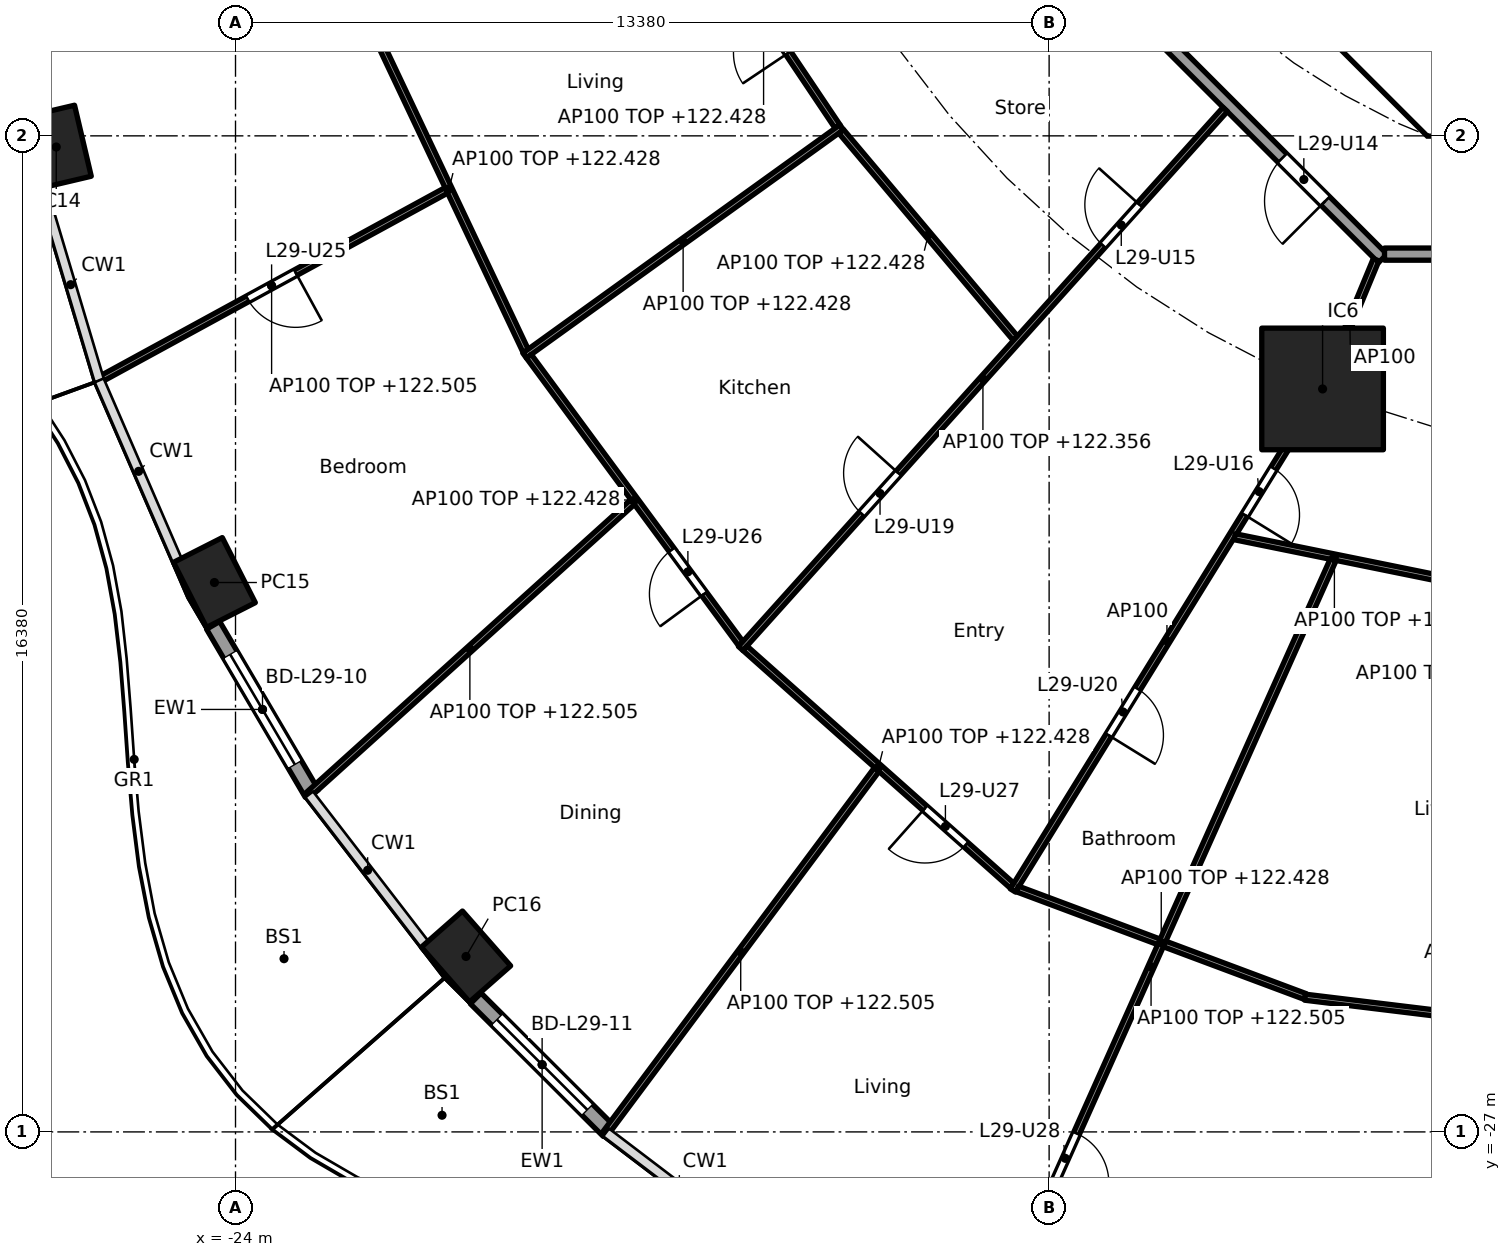
"""IFC4 building model, lengths in metres.
Left out: names, types, materials, properties, quantities, classifications, styles, units other than length and angle.
Written with IfcOpenShell. Run it as: python <this file> out.ifc"""

import sys

from ifc_helpers import new_model, si_unit, direction, frame, frame_2d, origin, origin_2d, place, context, subcontext, project, spatial, polyline, rectangle, hollow_rectangle, outline, extrude, element, fill, save


model = new_model("IFC4")
c1 = context("Model", 3, precision=1e-05, world=origin(), true_north=direction((0.0, 1.0)))
c2 = subcontext(c1, "Body", "Model", "MODEL_VIEW")
j1 = project(units=[si_unit("LENGTHUNIT", "METRE"), si_unit("PLANEANGLEUNIT", "RADIAN")], contexts=[c1])
p1 = place(None, origin())
s1 = spatial("IfcSite", under=j1, at=p1, CompositionType="ELEMENT")
p2 = place(p1, origin())
s2 = spatial("IfcBuilding", under=s1, at=p2, CompositionType="ELEMENT")
p3 = place(p2, frame((0.0, 0.0, 119.6)))
s3 = spatial("IfcBuildingStorey", under=s2, at=p3, CompositionType="ELEMENT", Elevation=119.6)
for number, where, z_axis, x_axis in (
    (1, (-26.948, -10.803, -0.26), (0.0, 0.0, 1.0), (0.229, -0.973, 0.0)),
    (2, (-24.347, -17.965, -0.26), (0.0, 0.0, 1.0), (0.452, -0.892, 0.0)),
    (3, (-20.209, -24.115, -0.26), (0.0, 0.0, 1.0), (0.66, -0.751, 0.0)),
):
    element("IfcColumn", number, at=place(p3, frame(where, z_axis=z_axis, x_axis=x_axis)), inside=s3, PredefinedType="COLUMN", context=c2, shape_type="SweptSolid", body=[
        extrude(hollow_rectangle(XDim=1.2, YDim=0.9, WallThickness=0.04, at=origin_2d()), origin(), (0.0, 0.0, 1.0), 3.96),
    ])
p4 = place(p3, frame((-6.123, -14.782, 0.0), z_axis=(0.0, 0.0, 1.0), x_axis=(1.0, 0.0, 0.0)))
e4 = element("IfcColumn", 4, at=p4, inside=s3, PredefinedType="COLUMN", context=c2, shape_type="SweptSolid", body=[
    extrude(rectangle(XDim=2.0, YDim=2.0, at=origin_2d()), origin(), (0.0, 0.0, 1.0), 3.7),
])
p5 = place(p3, frame((-22.744, -21.436, 0.0), z_axis=(0.0, 0.0, 1.0), x_axis=(-0.506314982873, 0.862348617508, 0.0)))
e5 = element("IfcWall", 5, at=p5, inside=s3, PredefinedType="SOLIDWALL", context=c2, shape_type="SweptSolid", body=[
    extrude(rectangle(XDim=3.208, YDim=0.25, at=frame_2d((1.604, 0.0))), origin(), (0.0, 0.0, 1.0), 3.44),
])
p6 = place(p5, frame((0.554, 0.0, 0.0)))
e6 = element("IfcOpeningElement", 6, at=p6, cuts=e5, PredefinedType="OPENING", context=c2, shape_type="SweptSolid", body=[
    extrude(rectangle(XDim=2.1, YDim=2.4, at=frame_2d((1.05, 1.2))), frame((0.0, 0.135, 0.0), z_axis=(0.0, -1.0, 0.0), x_axis=(1.0, 0.0, 0.0)), (0.0, 0.0, 1.0), 0.27),
])
p7 = place(p3, frame((-17.865, -26.985, 0.0), z_axis=(0.0, 0.0, 1.0), x_axis=(-0.707818274975, 0.706394570768, 0.0)))
e7 = element("IfcWall", 7, at=p7, inside=s3, PredefinedType="SOLIDWALL", context=c2, shape_type="SweptSolid", body=[
    extrude(rectangle(XDim=3.087, YDim=0.25, at=frame_2d((1.543, 0.0))), origin(), (0.0, 0.0, 1.0), 3.44),
])
p8 = place(p7, frame((0.493, 0.0, 0.0)))
e8 = element("IfcOpeningElement", 8, at=p8, cuts=e7, PredefinedType="OPENING", context=c2, shape_type="SweptSolid", body=[
    extrude(rectangle(XDim=2.1, YDim=2.4, at=frame_2d((1.05, 1.2))), frame((0.0, 0.135, 0.0), z_axis=(0.0, -1.0, 0.0), x_axis=(1.0, 0.0, 0.0)), (0.0, 0.0, 1.0), 0.27),
])
p9 = place(p3, frame((-9.988, -4.613, 0.0), z_axis=(0.0, 0.0, 1.0), x_axis=(0.707106781187, -0.707106781187, 0.0)))
e9 = element("IfcWall", 9, at=p9, inside=s3, PredefinedType="SHEAR", context=c2, shape_type="SweptSolid", body=[
    extrude(rectangle(XDim=7.602, YDim=0.6, at=frame_2d((3.801, 0.0))), origin(), (0.0, 0.0, 1.0), 3.44),
])
p10 = place(p9, frame((6.151, 0.0, 0.0)))
e10 = element("IfcOpeningElement", 10, at=p10, cuts=e9, PredefinedType="OPENING", context=c2, shape_type="SweptSolid", body=[
    extrude(rectangle(XDim=1.1, YDim=2.1, at=frame_2d((0.55, 1.05))), frame((0.0, 0.31, 0.0), z_axis=(0.0, -1.0, 0.0), x_axis=(1.0, 0.0, 0.0)), (0.0, 0.0, 1.0), 0.62),
])
p11 = place(p3, origin())
e11 = element("IfcWall", 11, at=p11, inside=s3, PredefinedType="SHEAR", context=c2, shape_type="SweptSolid", body=[
    extrude(outline(polyline([(-4.152, -10.025), (4.152, -10.025), (4.401, -9.776), (4.825, -10.2), (4.401, -10.625), (-4.401, -10.625), (-4.825, -10.2), (-4.401, -9.776), (-4.152, -10.025)])), origin(), (0.0, 0.0, 1.0), 3.44),
])
p12 = place(p3, frame((-12.635, -5.134, 0.0), z_axis=(0.0, 0.0, 1.0), x_axis=(0.707106781187, -0.707106781187, 0.0)))
e12 = element("IfcWall", 12, at=p12, inside=s3, PredefinedType="PARTITIONING", context=c2, shape_type="SweptSolid", body=[
    extrude(rectangle(XDim=10.609, YDim=0.2, at=frame_2d((5.305, 0.0))), origin(), (0.0, 0.0, 1.0), 3.44),
])
p13 = place(p12, frame((8.274, 0.0, 0.0)))
e13 = element("IfcOpeningElement", 13, at=p13, cuts=e12, PredefinedType="OPENING", context=c2, shape_type="SweptSolid", body=[
    extrude(rectangle(XDim=1.0, YDim=2.1, at=frame_2d((0.5, 1.05))), frame((0.0, 0.11, 0.0), z_axis=(0.0, -1.0, 0.0), x_axis=(1.0, 0.0, 0.0)), (0.0, 0.0, 1.0), 0.22),
])
p14 = place(p3, frame((-5.104, -12.565, 0.0), z_axis=(0.0, 0.0, 1.0), x_axis=(1.0, 0.0, 0.0)))
e14 = element("IfcWall", 14, at=p14, inside=s3, PredefinedType="PARTITIONING", context=c2, shape_type="SweptSolid", body=[
    extrude(rectangle(XDim=10.409, YDim=0.2, at=frame_2d((5.205, 0.0))), origin(), (0.0, 0.0, 1.0), 3.44),
])
p15 = place(p3, frame((-16.532, -6.84, 0.0), z_axis=(0.0, 0.0, 1.0), x_axis=(0.556994773624, -0.830515997531, 0.0)))
e15 = element("IfcWall", 15, at=p15, inside=s3, PredefinedType="PARTITIONING", context=c2, shape_type="SweptSolid", body=[
    extrude(rectangle(XDim=4.366, YDim=0.1, at=frame_2d((2.183, 0.0))), origin(), (0.0, 0.0, 1.0), 2.828),
])
p16 = place(p15, frame((2.01, 0.0, 0.0)))
e16 = element("IfcOpeningElement", 16, at=p16, cuts=e15, PredefinedType="OPENING", context=c2, shape_type="SweptSolid", body=[
    extrude(rectangle(XDim=0.9, YDim=2.1, at=frame_2d((0.45, 1.05))), frame((0.0, 0.06, 0.0), z_axis=(0.0, -1.0, 0.0), x_axis=(1.0, 0.0, 0.0)), (0.0, 0.0, 1.0), 0.12),
])
p17 = place(p3, frame((-21.75, -8.826, 0.0), z_axis=(0.0, 0.0, 1.0), x_axis=(0.427739388908, -0.903902104863, 0.0)))
e17 = element("IfcWall", 17, at=p17, inside=s3, PredefinedType="PARTITIONING", context=c2, shape_type="SweptSolid", body=[
    extrude(rectangle(XDim=5.899, YDim=0.1, at=frame_2d((2.949, 0.0))), origin(), (0.0, 0.0, 1.0), 2.828),
])
p18 = place(p3, frame((-20.533, -11.516, 0.0), z_axis=(0.0, 0.0, 1.0), x_axis=(-0.877731656478, -0.479152521872, 0.0)))
e18 = element("IfcWall", 18, at=p18, inside=s3, PredefinedType="PARTITIONING", context=c2, shape_type="SweptSolid", body=[
    extrude(rectangle(XDim=6.548, YDim=0.1, at=frame_2d((3.274, 0.0))), origin(), (0.0, 0.0, 1.0), 2.905),
])
p19 = place(p18, frame((2.824, 0.0, 0.0)))
e19 = element("IfcOpeningElement", 19, at=p19, cuts=e18, PredefinedType="OPENING", context=c2, shape_type="SweptSolid", body=[
    extrude(rectangle(XDim=0.9, YDim=2.1, at=frame_2d((0.45, 1.05))), frame((0.0, 0.06, 0.0), z_axis=(0.0, -1.0, 0.0), x_axis=(1.0, 0.0, 0.0)), (0.0, 0.0, 1.0), 0.12),
])
p20 = place(p3, frame((-14.031, -10.479, 0.0), z_axis=(0.0, 0.0, 1.0), x_axis=(-0.811653955345, -0.584138559567, 0.0)))
e20 = element("IfcWall", 20, at=p20, inside=s3, PredefinedType="PARTITIONING", context=c2, shape_type="SweptSolid", body=[
    extrude(rectangle(XDim=6.426, YDim=0.1, at=frame_2d((3.213, 0.0))), origin(), (0.0, 0.0, 1.0), 2.828),
])
p21 = place(p3, frame((-14.04, -10.547, 0.0), z_axis=(0.0, 0.0, 1.0), x_axis=(0.644036028289, -0.764995159635, 0.0)))
e21 = element("IfcWall", 21, at=p21, inside=s3, PredefinedType="PARTITIONING", context=c2, shape_type="SweptSolid", body=[
    extrude(rectangle(XDim=4.448, YDim=0.1, at=frame_2d((2.224, 0.0))), origin(), (0.0, 0.0, 1.0), 2.828),
])
p22 = place(p3, frame((-19.176, -14.244, 0.0), z_axis=(0.0, 0.0, 1.0), x_axis=(0.593532053206, -0.80481035146, 0.0)))
e22 = element("IfcWall", 22, at=p22, inside=s3, PredefinedType="PARTITIONING", context=c2, shape_type="SweptSolid", body=[
    extrude(rectangle(XDim=5.876, YDim=0.1, at=frame_2d((2.938, 0.0))), origin(), (0.0, 0.0, 1.0), 2.828),
])
p23 = place(p22, frame((3.957, 0.0, 0.0)))
e23 = element("IfcOpeningElement", 23, at=p23, cuts=e22, PredefinedType="OPENING", context=c2, shape_type="SweptSolid", body=[
    extrude(rectangle(XDim=0.9, YDim=2.1, at=frame_2d((0.45, 1.05))), frame((0.0, 0.06, 0.0), z_axis=(0.0, -1.0, 0.0), x_axis=(1.0, 0.0, 0.0)), (0.0, 0.0, 1.0), 0.12),
])
p24 = place(p3, frame((-17.47, -16.642, 0.0), z_axis=(0.0, 0.0, 1.0), x_axis=(-0.742345465337, -0.670017320742, 0.0)))
e24 = element("IfcWall", 24, at=p24, inside=s3, PredefinedType="PARTITIONING", context=c2, shape_type="SweptSolid", body=[
    extrude(rectangle(XDim=7.21, YDim=0.1, at=frame_2d((3.605, 0.0))), origin(), (0.0, 0.0, 1.0), 2.905),
])
p25 = place(p3, frame((-7.725, -10.186, 0.0), z_axis=(0.0, 0.0, 1.0), x_axis=(-0.668498346565, -0.743713628112, 0.0)))
e25 = element("IfcWall", 25, at=p25, inside=s3, PredefinedType="PARTITIONING", context=c2, shape_type="SweptSolid", body=[
    extrude(rectangle(XDim=11.919, YDim=0.1, at=frame_2d((5.959, 0.0))), origin(), (0.0, 0.0, 1.0), 2.756),
])
p26 = place(p25, frame((2.106, 0.0, 0.0)))
e26 = element("IfcOpeningElement", 26, at=p26, cuts=e25, PredefinedType="OPENING", context=c2, shape_type="SweptSolid", body=[
    extrude(rectangle(XDim=0.9, YDim=2.1, at=frame_2d((0.45, 1.05))), frame((0.0, 0.06, 0.0), z_axis=(0.0, -1.0, 0.0), x_axis=(1.0, 0.0, 0.0)), (0.0, 0.0, 1.0), 0.12),
])
p27 = place(p25, frame((8.041, 0.0, 0.0)))
e27 = element("IfcOpeningElement", 27, at=p27, cuts=e25, PredefinedType="OPENING", context=c2, shape_type="SweptSolid", body=[
    extrude(rectangle(XDim=0.9, YDim=2.1, at=frame_2d((0.45, 1.05))), frame((0.0, 0.06, 0.0), z_axis=(0.0, -1.0, 0.0), x_axis=(1.0, 0.0, 0.0)), (0.0, 0.0, 1.0), 0.12),
])
p28 = place(p3, frame((-15.622, -19.046, 0.0), z_axis=(0.0, 0.0, 1.0), x_axis=(0.747342891849, -0.664438561496, 0.0)))
e28 = element("IfcWall", 28, at=p28, inside=s3, PredefinedType="PARTITIONING", context=c2, shape_type="SweptSolid", body=[
    extrude(rectangle(XDim=5.881, YDim=0.1, at=frame_2d((2.94, 0.0))), origin(), (0.0, 0.0, 1.0), 2.828),
])
p29 = place(p28, frame((3.961, 0.0, 0.0)))
e29 = element("IfcOpeningElement", 29, at=p29, cuts=e28, PredefinedType="OPENING", context=c2, shape_type="SweptSolid", body=[
    extrude(rectangle(XDim=0.9, YDim=2.1, at=frame_2d((0.45, 1.05))), frame((0.0, 0.06, 0.0), z_axis=(0.0, -1.0, 0.0), x_axis=(1.0, 0.0, 0.0)), (0.0, 0.0, 1.0), 0.12),
])
p30 = place(p3, frame((-13.454, -21.04, 0.0), z_axis=(0.0, 0.0, 1.0), x_axis=(-0.597848033124, -0.801609461826, 0.0)))
e30 = element("IfcWall", 30, at=p30, inside=s3, PredefinedType="PARTITIONING", context=c2, shape_type="SweptSolid", body=[
    extrude(rectangle(XDim=7.486, YDim=0.1, at=frame_2d((3.743, 0.0))), origin(), (0.0, 0.0, 1.0), 2.905),
])
p31 = place(p3, frame((-5.243, -12.657, 0.0), z_axis=(0.0, 0.0, 1.0), x_axis=(-0.382811769845, -0.923826362943, 0.0)))
e31 = element("IfcWall", 31, at=p31, inside=s3, PredefinedType="PARTITIONING", context=c2, shape_type="SweptSolid", body=[
    extrude(rectangle(XDim=2.25, YDim=0.1, at=frame_2d((1.125, 0.0))), origin(), (0.0, 0.0, 1.0), 3.44),
])
p32 = place(p3, frame((-6.149, -14.825, 0.0), z_axis=(0.0, 0.0, 1.0), x_axis=(-0.525396393596, -0.850857584791, 0.0)))
e32 = element("IfcWall", 32, at=p32, inside=s3, PredefinedType="PARTITIONING", context=c2, shape_type="SweptSolid", body=[
    extrude(rectangle(XDim=9.643, YDim=0.1, at=frame_2d((4.822, 0.0))), origin(), (0.0, 0.0, 1.0), 3.44),
])
p33 = place(p32, frame((1.485, 0.0, 0.0)))
e33 = element("IfcOpeningElement", 33, at=p33, cuts=e32, PredefinedType="OPENING", context=c2, shape_type="SweptSolid", body=[
    extrude(rectangle(XDim=0.9, YDim=2.1, at=frame_2d((0.45, 1.05))), frame((0.0, 0.06, 0.0), z_axis=(0.0, -1.0, 0.0), x_axis=(1.0, 0.0, 0.0)), (0.0, 0.0, 1.0), 0.12),
])
p34 = place(p32, frame((5.744, 0.0, 0.0)))
e34 = element("IfcOpeningElement", 34, at=p34, cuts=e32, PredefinedType="OPENING", context=c2, shape_type="SweptSolid", body=[
    extrude(rectangle(XDim=0.9, YDim=2.1, at=frame_2d((0.45, 1.05))), frame((0.0, 0.06, 0.0), z_axis=(0.0, -1.0, 0.0), x_axis=(1.0, 0.0, 0.0)), (0.0, 0.0, 1.0), 0.12),
])
p35 = place(p3, frame((-7.568, -17.212, 0.0), z_axis=(0.0, 0.0, 1.0), x_axis=(0.979967079473, -0.199159541946, 0.0)))
e35 = element("IfcWall", 35, at=p35, inside=s3, PredefinedType="PARTITIONING", context=c2, shape_type="SweptSolid", body=[
    extrude(rectangle(XDim=3.347, YDim=0.1, at=frame_2d((1.673, 0.0))), origin(), (0.0, 0.0, 1.0), 2.828),
])
p36 = place(p3, frame((-11.143, -23.004, 0.0), z_axis=(0.0, 0.0, 1.0), x_axis=(0.936721765635, -0.350074754567, 0.0)))
e36 = element("IfcWall", 36, at=p36, inside=s3, PredefinedType="PARTITIONING", context=c2, shape_type="SweptSolid", body=[
    extrude(rectangle(XDim=5.053, YDim=0.1, at=frame_2d((2.526, 0.0))), origin(), (0.0, 0.0, 1.0), 2.828),
])
p37 = place(p3, frame((-5.949, -17.591, 0.0), z_axis=(0.0, 0.0, 1.0), x_axis=(-0.40838467696, -0.912809923053, 0.0)))
e37 = element("IfcWall", 37, at=p37, inside=s3, PredefinedType="PARTITIONING", context=c2, shape_type="SweptSolid", body=[
    extrude(rectangle(XDim=14.665, YDim=0.1, at=frame_2d((7.333, 0.0))), origin(), (0.0, 0.0, 1.0), 2.905),
])
p38 = place(p37, frame((10.334, 0.0, 0.0)))
e38 = element("IfcOpeningElement", 38, at=p38, cuts=e37, PredefinedType="OPENING", context=c2, shape_type="SweptSolid", body=[
    extrude(rectangle(XDim=0.9, YDim=2.1, at=frame_2d((0.45, 1.05))), frame((0.0, 0.06, 0.0), z_axis=(0.0, -1.0, 0.0), x_axis=(1.0, 0.0, 0.0)), (0.0, 0.0, 1.0), 0.12),
])
p39 = place(p3, frame((-6.413, -24.784, 0.0), z_axis=(0.0, 0.0, 1.0), x_axis=(0.992690077723, -0.120691381588, 0.0)))
e39 = element("IfcWall", 39, at=p39, inside=s3, PredefinedType="PARTITIONING", context=c2, shape_type="SweptSolid", body=[
    extrude(rectangle(XDim=5.286, YDim=0.1, at=frame_2d((2.643, 0.0))), origin(), (0.0, 0.0, 1.0), 2.828),
])
p40 = place(p39, frame((3.539, 0.0, 0.0)))
e40 = element("IfcOpeningElement", 40, at=p40, cuts=e39, PredefinedType="OPENING", context=c2, shape_type="SweptSolid", body=[
    extrude(rectangle(XDim=0.9, YDim=2.1, at=frame_2d((0.45, 1.05))), frame((0.0, 0.06, 0.0), z_axis=(0.0, -1.0, 0.0), x_axis=(1.0, 0.0, 0.0)), (0.0, 0.0, 1.0), 0.12),
])
p41 = place(p3, frame((-3.749, -25.159, 0.0), z_axis=(0.0, 0.0, 1.0), x_axis=(-0.188392334675, -0.982093848996, 0.0)))
e41 = element("IfcWall", 41, at=p41, inside=s3, PredefinedType="PARTITIONING", context=c2, shape_type="SweptSolid", body=[
    extrude(rectangle(XDim=8.0, YDim=0.1, at=frame_2d((4.0, 0.0))), origin(), (0.0, 0.0, 1.0), 2.905),
])
p42 = place(p6, origin())
e42 = element("IfcDoor", 42, at=p42, inside=s3, OperationType="SLIDING_TO_LEFT", PredefinedType="DOOR", context=c2, shape_type="SweptSolid", body=[
    extrude(rectangle(XDim=2.1, YDim=2.4, at=frame_2d((1.05, 1.2))), frame((0.0, 0.025, 0.0), z_axis=(0.0, -1.0, 0.0), x_axis=(1.0, 0.0, 0.0)), (0.0, 0.0, 1.0), 0.05),
])
fill(e6, e42)
p43 = place(p8, origin())
e43 = element("IfcDoor", 43, at=p43, inside=s3, OperationType="SLIDING_TO_LEFT", PredefinedType="DOOR", context=c2, shape_type="SweptSolid", body=[
    extrude(rectangle(XDim=2.1, YDim=2.4, at=frame_2d((1.05, 1.2))), frame((0.0, 0.025, 0.0), z_axis=(0.0, -1.0, 0.0), x_axis=(1.0, 0.0, 0.0)), (0.0, 0.0, 1.0), 0.05),
])
fill(e8, e43)
p44 = place(p10, origin())
e44 = element("IfcDoor", 44, at=p44, inside=s3, OperationType="SINGLE_SWING_RIGHT", PredefinedType="DOOR", context=c2, shape_type="SweptSolid", body=[
    extrude(rectangle(XDim=1.1, YDim=2.1, at=frame_2d((0.55, 1.05))), frame((0.0, 0.025, 0.0), z_axis=(0.0, -1.0, 0.0), x_axis=(1.0, 0.0, 0.0)), (0.0, 0.0, 1.0), 0.05),
])
fill(e10, e44)
p45 = place(p13, frame((1.0, 0.0, 0.0), x_axis=(-1.0, 0.0, 0.0)))
e45 = element("IfcDoor", 45, at=p45, inside=s3, OperationType="SINGLE_SWING_LEFT", PredefinedType="DOOR", context=c2, shape_type="SweptSolid", body=[
    extrude(rectangle(XDim=1.0, YDim=2.1, at=frame_2d((0.5, 1.05))), frame((0.0, 0.025, 0.0), z_axis=(0.0, -1.0, 0.0), x_axis=(1.0, 0.0, 0.0)), (0.0, 0.0, 1.0), 0.05),
])
fill(e13, e45)
p46 = place(p26, frame((0.9, 0.0, 0.0), x_axis=(-1.0, 0.0, 0.0)))
e46 = element("IfcDoor", 46, at=p46, inside=s3, OperationType="SINGLE_SWING_RIGHT", PredefinedType="DOOR", context=c2, shape_type="SweptSolid", body=[
    extrude(rectangle(XDim=0.9, YDim=2.1, at=frame_2d((0.45, 1.05))), frame((0.0, 0.025, 0.0), z_axis=(0.0, -1.0, 0.0), x_axis=(1.0, 0.0, 0.0)), (0.0, 0.0, 1.0), 0.05),
])
fill(e26, e46)
p47 = place(p33, origin())
e47 = element("IfcDoor", 47, at=p47, inside=s3, OperationType="SINGLE_SWING_RIGHT", PredefinedType="DOOR", context=c2, shape_type="SweptSolid", body=[
    extrude(rectangle(XDim=0.9, YDim=2.1, at=frame_2d((0.45, 1.05))), frame((0.0, 0.025, 0.0), z_axis=(0.0, -1.0, 0.0), x_axis=(1.0, 0.0, 0.0)), (0.0, 0.0, 1.0), 0.05),
])
fill(e33, e47)
p48 = place(p16, frame((0.9, 0.0, 0.0), x_axis=(-1.0, 0.0, 0.0)))
e48 = element("IfcDoor", 48, at=p48, inside=s3, OperationType="SINGLE_SWING_LEFT", PredefinedType="DOOR", context=c2, shape_type="SweptSolid", body=[
    extrude(rectangle(XDim=0.9, YDim=2.1, at=frame_2d((0.45, 1.05))), frame((0.0, 0.025, 0.0), z_axis=(0.0, -1.0, 0.0), x_axis=(1.0, 0.0, 0.0)), (0.0, 0.0, 1.0), 0.05),
])
fill(e16, e48)
p49 = place(p27, frame((0.9, 0.0, 0.0), x_axis=(-1.0, 0.0, 0.0)))
e49 = element("IfcDoor", 49, at=p49, inside=s3, OperationType="SINGLE_SWING_RIGHT", PredefinedType="DOOR", context=c2, shape_type="SweptSolid", body=[
    extrude(rectangle(XDim=0.9, YDim=2.1, at=frame_2d((0.45, 1.05))), frame((0.0, 0.025, 0.0), z_axis=(0.0, -1.0, 0.0), x_axis=(1.0, 0.0, 0.0)), (0.0, 0.0, 1.0), 0.05),
])
fill(e27, e49)
p50 = place(p34, origin())
e50 = element("IfcDoor", 50, at=p50, inside=s3, OperationType="SINGLE_SWING_RIGHT", PredefinedType="DOOR", context=c2, shape_type="SweptSolid", body=[
    extrude(rectangle(XDim=0.9, YDim=2.1, at=frame_2d((0.45, 1.05))), frame((0.0, 0.025, 0.0), z_axis=(0.0, -1.0, 0.0), x_axis=(1.0, 0.0, 0.0)), (0.0, 0.0, 1.0), 0.05),
])
fill(e34, e50)
p51 = place(p19, origin())
e51 = element("IfcDoor", 51, at=p51, inside=s3, OperationType="SINGLE_SWING_LEFT", PredefinedType="DOOR", context=c2, shape_type="SweptSolid", body=[
    extrude(rectangle(XDim=0.9, YDim=2.1, at=frame_2d((0.45, 1.05))), frame((0.0, 0.025, 0.0), z_axis=(0.0, -1.0, 0.0), x_axis=(1.0, 0.0, 0.0)), (0.0, 0.0, 1.0), 0.05),
])
fill(e19, e51)
p52 = place(p23, frame((0.9, 0.0, 0.0), x_axis=(-1.0, 0.0, 0.0)))
e52 = element("IfcDoor", 52, at=p52, inside=s3, OperationType="SINGLE_SWING_LEFT", PredefinedType="DOOR", context=c2, shape_type="SweptSolid", body=[
    extrude(rectangle(XDim=0.9, YDim=2.1, at=frame_2d((0.45, 1.05))), frame((0.0, 0.025, 0.0), z_axis=(0.0, -1.0, 0.0), x_axis=(1.0, 0.0, 0.0)), (0.0, 0.0, 1.0), 0.05),
])
fill(e23, e52)
p53 = place(p29, frame((0.9, 0.0, 0.0), x_axis=(-1.0, 0.0, 0.0)))
e53 = element("IfcDoor", 53, at=p53, inside=s3, OperationType="SINGLE_SWING_RIGHT", PredefinedType="DOOR", context=c2, shape_type="SweptSolid", body=[
    extrude(rectangle(XDim=0.9, YDim=2.1, at=frame_2d((0.45, 1.05))), frame((0.0, 0.025, 0.0), z_axis=(0.0, -1.0, 0.0), x_axis=(1.0, 0.0, 0.0)), (0.0, 0.0, 1.0), 0.05),
])
fill(e29, e53)
p54 = place(p38, origin())
e54 = element("IfcDoor", 54, at=p54, inside=s3, OperationType="SINGLE_SWING_RIGHT", PredefinedType="DOOR", context=c2, shape_type="SweptSolid", body=[
    extrude(rectangle(XDim=0.9, YDim=2.1, at=frame_2d((0.45, 1.05))), frame((0.0, 0.025, 0.0), z_axis=(0.0, -1.0, 0.0), x_axis=(1.0, 0.0, 0.0)), (0.0, 0.0, 1.0), 0.05),
])
fill(e38, e54)
save(model, sys.argv[1])
